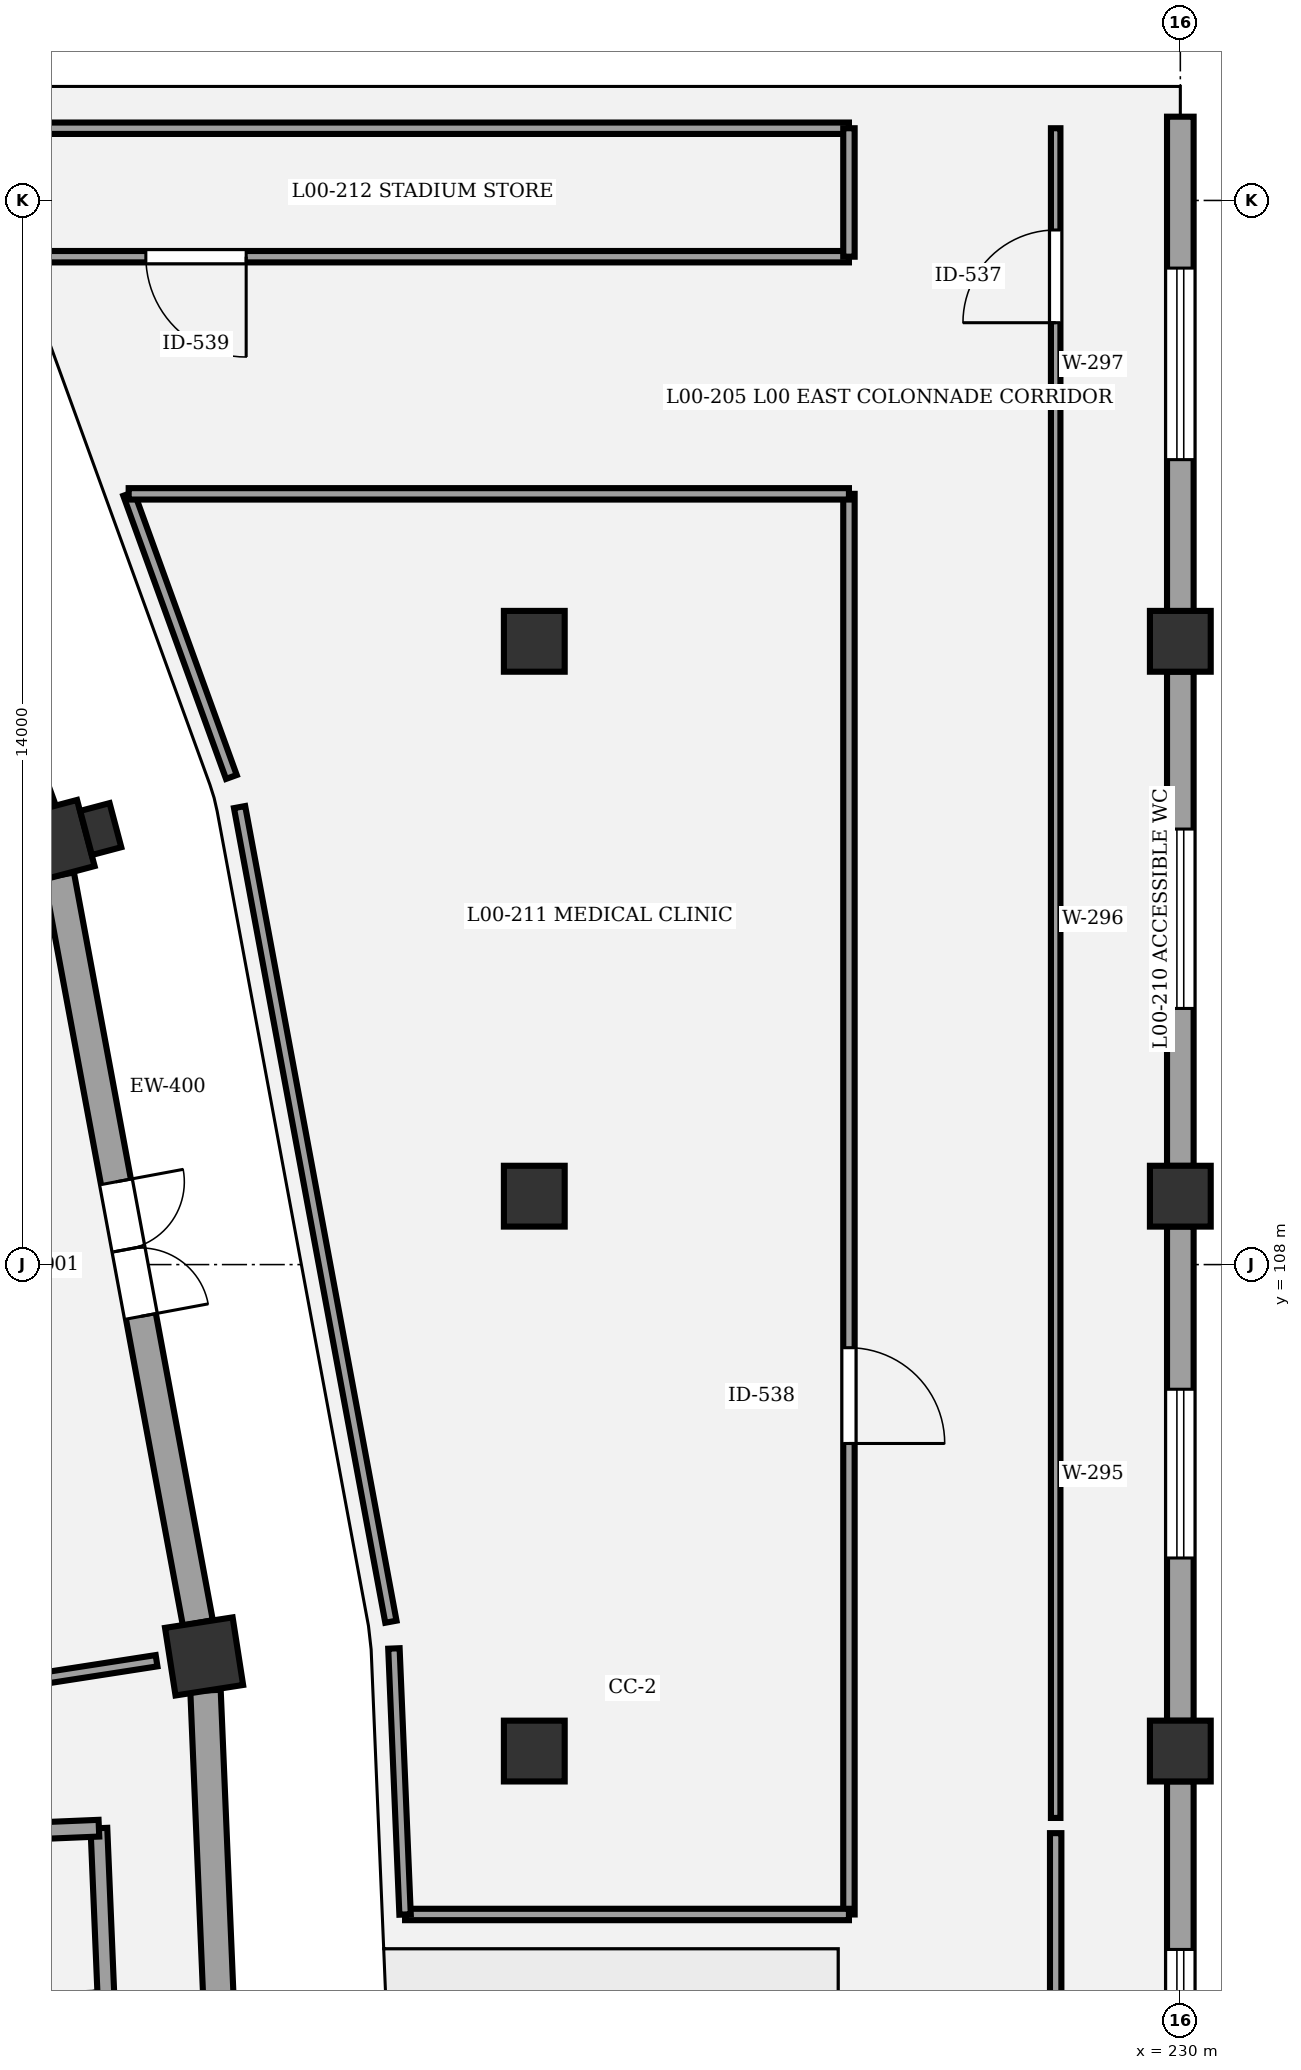
"""IFC4 building model, lengths in metres.
Left out: names, types, materials, properties, quantities, classifications, styles, units other than length and angle.
Written with IfcOpenShell. Run it as: python <this file> out.ifc"""

import sys

from ifc_helpers import new_model, si_unit, direction, frame, frame_2d, origin, origin_2d, place, context, subcontext, project, spatial, rectangle, circle, extrude, element, fill, save


model = new_model("IFC4")
c1 = context("Model", 3, precision=1e-05, world=origin(), true_north=direction((0.0, 1.0)))
c2 = subcontext(c1, "Body", "Model", "MODEL_VIEW")
j1 = project(units=[si_unit("LENGTHUNIT", "METRE"), si_unit("PLANEANGLEUNIT", "RADIAN")], contexts=[c1])
p1 = place(None, origin())
s1 = spatial("IfcSite", under=j1, at=p1, CompositionType="ELEMENT")
p2 = place(p1, origin())
s2 = spatial("IfcBuilding", under=s1, at=p2, CompositionType="ELEMENT")
p3 = place(p2, origin())
s3 = spatial("IfcBuildingStorey", under=s2, at=p3, CompositionType="ELEMENT", Elevation=0.0)
for number, where, z_axis, x_axis in (
    (1, (217.156, 102.845, 0.0), (0.0, 0.0, 1.0), (0.988, 0.153, 0.0)),
    (2, (215.165, 113.562, 0.0), (0.0, 0.0, 1.0), (0.967, 0.256, 0.0)),
):
    element("IfcColumn", number, at=place(p3, frame(where, z_axis=z_axis, x_axis=x_axis)), inside=s3, PredefinedType="COLUMN", context=c2, shape_type="SweptSolid", body=[
        extrude(rectangle(XDim=0.9, YDim=0.9, at=origin_2d()), origin(), (0.0, 0.0, 1.0), 5.4),
    ])
p4 = place(p3, frame((215.796, 113.73, 0.0), z_axis=(0.0, 0.0, 1.0), x_axis=(-0.256289373133, 0.966600102017, 0.0)))
e3 = element("IfcColumn", 3, at=p4, inside=s3, PredefinedType="PILASTER", context=c2, shape_type="SweptSolid", body=[
    extrude(rectangle(XDim=0.6, YDim=0.4, at=origin_2d()), origin(), (0.0, 0.0, 1.0), 5.4),
])
for number, where, z_axis, x_axis in (
    (4, (221.5, 101.6, 0.0), (0.0, 0.0, 1.0), (1.0, 0.0, 0.0)),
    (5, (221.5, 108.9, 0.0), (0.0, 0.0, 1.0), (1.0, 0.0, 0.0)),
    (6, (221.5, 116.2, 0.0), (0.0, 0.0, 1.0), (1.0, 0.0, 0.0)),
    (7, (230.0, 101.6, 0.0), (0.0, 0.0, 1.0), (1.0, 0.0, 0.0)),
    (8, (230.0, 108.9, 0.0), (0.0, 0.0, 1.0), (1.0, 0.0, 0.0)),
    (9, (230.0, 116.2, 0.0), (0.0, 0.0, 1.0), (1.0, 0.0, 0.0)),
):
    element("IfcColumn", number, at=place(p3, frame(where, z_axis=z_axis, x_axis=x_axis)), inside=s3, PredefinedType="COLUMN", context=c2, shape_type="SweptSolid", body=[
        extrude(circle(Radius=0.4, at=origin_2d()), origin(), (0.0, 0.0, 1.0), 5.4),
    ])
p5 = place(p3, frame((217.174, 102.397, 0.0), z_axis=(0.0, 0.0, 1.0), x_axis=(0.041899972393, -0.999121810548, 0.0)))
e10 = element("IfcWall", 10, at=p5, inside=s3, PredefinedType="STANDARD", context=c2, shape_type="SweptSolid", body=[
    extrude(rectangle(XDim=14.963, YDim=0.4, at=frame_2d((7.481, 0.0))), origin(), (0.0, 0.0, 1.0), 4.25),
])
p6 = place(p5, frame((6.931, 0.0, 1.1)))
e11 = element("IfcOpeningElement", 11, at=p6, cuts=e10, PredefinedType="OPENING", context=c2, shape_type="SweptSolid", body=[
    extrude(rectangle(XDim=1.1, YDim=1.55, at=frame_2d((0.55, 0.775))), frame((0.0, 0.21, 0.0), z_axis=(0.0, -1.0, 0.0), x_axis=(1.0, 0.0, 0.0)), (0.0, 0.0, 1.0), 0.42),
])
p7 = place(p3, frame((215.246, 113.122, 0.0), z_axis=(0.0, 0.0, 1.0), x_axis=(0.182624880635, -0.98318266511, 0.0)))
e12 = element("IfcWall", 12, at=p7, inside=s3, PredefinedType="STANDARD", context=c2, shape_type="SweptSolid", body=[
    extrude(rectangle(XDim=10.005, YDim=0.4, at=frame_2d((5.002, 0.0))), origin(), (0.0, 0.0, 1.0), 4.25),
])
p8 = place(p7, frame((4.102, 0.0, 0.0)))
e13 = element("IfcOpeningElement", 13, at=p8, cuts=e12, PredefinedType="OPENING", context=c2, shape_type="SweptSolid", body=[
    extrude(rectangle(XDim=1.8, YDim=2.4, at=frame_2d((0.9, 1.2))), frame((0.0, 0.21, 0.0), z_axis=(0.0, -1.0, 0.0), x_axis=(1.0, 0.0, 0.0)), (0.0, 0.0, 1.0), 0.42),
])
p9 = place(p3, frame((212.009, 122.261, 0.0), z_axis=(0.0, 0.0, 1.0), x_axis=(0.341030587203, -0.940052199929, 0.0)))
e14 = element("IfcWall", 14, at=p9, inside=s3, PredefinedType="STANDARD", context=c2, shape_type="SweptSolid", body=[
    extrude(rectangle(XDim=8.805, YDim=0.4, at=frame_2d((4.403, 0.0))), origin(), (0.0, 0.0, 1.0), 4.25),
])
p10 = place(p9, frame((3.453, 0.0, 0.0)))
e15 = element("IfcOpeningElement", 15, at=p10, cuts=e14, PredefinedType="OPENING", context=c2, shape_type="SweptSolid", body=[
    extrude(rectangle(XDim=1.9, YDim=2.4, at=frame_2d((0.95, 1.2))), frame((0.0, 0.21, 0.0), z_axis=(0.0, -1.0, 0.0), x_axis=(1.0, 0.0, 0.0)), (0.0, 0.0, 1.0), 0.42),
])
p11 = place(p3, frame((230.0, 101.202, 0.0), z_axis=(0.0, 0.0, 1.0), x_axis=(0.0, -1.0, 0.0)))
e16 = element("IfcWall", 16, at=p11, inside=s3, PredefinedType="STANDARD", context=c2, shape_type="SweptSolid", body=[
    extrude(rectangle(XDim=6.504, YDim=0.35, at=frame_2d((3.252, 0.0))), origin(), (0.0, 0.0, 1.0), 4.16),
])
p12 = place(p11, frame((2.212, 0.0, 0.9)))
e17 = element("IfcOpeningElement", 17, at=p12, cuts=e16, PredefinedType="OPENING", context=c2, shape_type="SweptSolid", body=[
    extrude(rectangle(XDim=2.08, YDim=1.95, at=frame_2d((1.04, 0.975))), frame((0.0, 0.185, 0.0), z_axis=(0.0, -1.0, 0.0), x_axis=(1.0, 0.0, 0.0)), (0.0, 0.0, 1.0), 0.37),
])
p13 = place(p3, frame((230.0, 108.502, 0.0), z_axis=(0.0, 0.0, 1.0), x_axis=(0.0, -1.0, 0.0)))
e18 = element("IfcWall", 18, at=p13, inside=s3, PredefinedType="STANDARD", context=c2, shape_type="SweptSolid", body=[
    extrude(rectangle(XDim=6.504, YDim=0.35, at=frame_2d((3.252, 0.0))), origin(), (0.0, 0.0, 1.0), 4.16),
])
p14 = place(p13, frame((2.142, 0.0, 0.9)))
e19 = element("IfcOpeningElement", 19, at=p14, cuts=e18, PredefinedType="OPENING", context=c2, shape_type="SweptSolid", body=[
    extrude(rectangle(XDim=2.22, YDim=1.95, at=frame_2d((1.11, 0.975))), frame((0.0, 0.185, 0.0), z_axis=(0.0, -1.0, 0.0), x_axis=(1.0, 0.0, 0.0)), (0.0, 0.0, 1.0), 0.37),
])
p15 = place(p3, frame((230.0, 115.802, 0.0), z_axis=(0.0, 0.0, 1.0), x_axis=(0.0, -1.0, 0.0)))
e20 = element("IfcWall", 20, at=p15, inside=s3, PredefinedType="STANDARD", context=c2, shape_type="SweptSolid", body=[
    extrude(rectangle(XDim=6.504, YDim=0.35, at=frame_2d((3.252, 0.0))), origin(), (0.0, 0.0, 1.0), 4.16),
])
p16 = place(p15, frame((2.072, 0.0, 0.9)))
e21 = element("IfcOpeningElement", 21, at=p16, cuts=e20, PredefinedType="OPENING", context=c2, shape_type="SweptSolid", body=[
    extrude(rectangle(XDim=2.36, YDim=1.95, at=frame_2d((1.18, 0.975))), frame((0.0, 0.185, 0.0), z_axis=(0.0, -1.0, 0.0), x_axis=(1.0, 0.0, 0.0)), (0.0, 0.0, 1.0), 0.37),
])
p17 = place(p3, frame((230.0, 123.102, 0.0), z_axis=(0.0, 0.0, 1.0), x_axis=(0.0, -1.0, 0.0)))
e22 = element("IfcWall", 22, at=p17, inside=s3, PredefinedType="STANDARD", context=c2, shape_type="SweptSolid", body=[
    extrude(rectangle(XDim=6.504, YDim=0.35, at=frame_2d((3.252, 0.0))), origin(), (0.0, 0.0, 1.0), 4.16),
])
p18 = place(p17, frame((1.992, 0.0, 0.9)))
e23 = element("IfcOpeningElement", 23, at=p18, cuts=e22, PredefinedType="OPENING", context=c2, shape_type="SweptSolid", body=[
    extrude(rectangle(XDim=2.52, YDim=1.95, at=frame_2d((1.26, 0.975))), frame((0.0, 0.185, 0.0), z_axis=(0.0, -1.0, 0.0), x_axis=(1.0, 0.0, 0.0)), (0.0, 0.0, 1.0), 0.37),
])
p19 = place(p3, frame((215.772, 100.585, 0.0), z_axis=(0.0, 0.0, 1.0), x_axis=(0.041871977473, -0.999122984173, 0.0)))
e24 = element("IfcWall", 24, at=p19, inside=s3, PredefinedType="SHEAR", context=c2, shape_type="SweptSolid", body=[
    extrude(rectangle(XDim=11.02, YDim=0.22, at=frame_2d((5.51, 0.0))), origin(), (0.0, 0.0, 1.0), 5.15),
])
p20 = place(p3, frame((211.365, 100.4, 0.0), z_axis=(0.0, 0.0, 1.0), x_axis=(0.999121521721, 0.041906859039, 0.0)))
e25 = element("IfcWall", 25, at=p20, inside=s3, PredefinedType="SHEAR", context=c2, shape_type="SweptSolid", body=[
    extrude(rectangle(XDim=4.41, YDim=0.22, at=frame_2d((2.205, 0.0))), origin(), (0.0, 0.0, 1.0), 5.15),
])
p21 = place(p3, frame((228.36, 78.29, 0.0), z_axis=(0.0, 0.0, 1.0), x_axis=(0.0, 1.0, 0.0)))
e26 = element("IfcWall", 26, at=p21, inside=s3, PredefinedType="PARTITIONING", context=c2, shape_type="SweptSolid", body=[
    extrude(rectangle(XDim=22.23, YDim=0.15, at=frame_2d((11.115, 0.0))), origin(), (0.0, 0.0, 1.0), 4.15),
])
p22 = place(p21, frame((4.402, 0.0, 0.0)))
e27 = element("IfcOpeningElement", 27, at=p22, cuts=e26, PredefinedType="OPENING", context=c2, shape_type="SweptSolid", body=[
    extrude(rectangle(XDim=1.18, YDim=2.3, at=frame_2d((0.59, 1.15))), frame((0.0, 0.085, 0.0), z_axis=(0.0, -1.0, 0.0), x_axis=(1.0, 0.0, 0.0)), (0.0, 0.0, 1.0), 0.17),
])
p23 = place(p3, frame((228.36, 100.72, 0.0), z_axis=(0.0, 0.0, 1.0), x_axis=(0.0, 1.0, 0.0)))
e28 = element("IfcWall", 28, at=p23, inside=s3, PredefinedType="PARTITIONING", context=c2, shape_type="SweptSolid", body=[
    extrude(rectangle(XDim=22.23, YDim=0.125, at=frame_2d((11.115, 0.0))), origin(), (0.0, 0.0, 1.0), 4.15),
])
p24 = place(p23, frame((19.671, 0.0, 0.0)))
e29 = element("IfcOpeningElement", 29, at=p24, cuts=e28, PredefinedType="OPENING", context=c2, shape_type="SweptSolid", body=[
    extrude(rectangle(XDim=1.22, YDim=2.3, at=frame_2d((0.61, 1.15))), frame((0.0, 0.073, 0.0), z_axis=(0.0, -1.0, 0.0), x_axis=(1.0, 0.0, 0.0)), (0.0, 0.0, 1.0), 0.145),
])
p25 = place(p3, frame((225.64, 118.14, 0.0), z_axis=(0.0, 0.0, 1.0), x_axis=(0.0, -1.0, 0.0)))
e30 = element("IfcWall", 30, at=p25, inside=s3, PredefinedType="PARTITIONING", context=c2, shape_type="SweptSolid", body=[
    extrude(rectangle(XDim=18.69, YDim=0.15, at=frame_2d((9.345, 0.0))), origin(), (0.0, 0.0, 1.0), 4.15),
])
p26 = place(p25, frame((11.233, 0.0, 0.0)))
e31 = element("IfcOpeningElement", 31, at=p26, cuts=e30, PredefinedType="OPENING", context=c2, shape_type="SweptSolid", body=[
    extrude(rectangle(XDim=1.26, YDim=2.3, at=frame_2d((0.63, 1.15))), frame((0.0, 0.085, 0.0), z_axis=(0.0, -1.0, 0.0), x_axis=(1.0, 0.0, 0.0)), (0.0, 0.0, 1.0), 0.17),
])
p27 = place(p3, frame((225.64, 121.26, 0.0), z_axis=(0.0, 0.0, 1.0), x_axis=(-1.0, 0.0, 0.0)))
e32 = element("IfcWall", 32, at=p27, inside=s3, PredefinedType="PARTITIONING", context=c2, shape_type="SweptSolid", body=[
    extrude(rectangle(XDim=10.608, YDim=0.15, at=frame_2d((5.304, 0.0))), origin(), (0.0, 0.0, 1.0), 4.15),
])
p28 = place(p27, frame((7.931, 0.0, 0.0)))
e33 = element("IfcOpeningElement", 33, at=p28, cuts=e32, PredefinedType="OPENING", context=c2, shape_type="SweptSolid", body=[
    extrude(rectangle(XDim=1.32, YDim=2.3, at=frame_2d((0.66, 1.15))), frame((0.0, 0.085, 0.0), z_axis=(0.0, -1.0, 0.0), x_axis=(1.0, 0.0, 0.0)), (0.0, 0.0, 1.0), 0.17),
])
p29 = place(p3, frame((216.53, 102.789, 0.0), z_axis=(0.0, 0.0, 1.0), x_axis=(-0.988185582016, -0.153262048451, 0.0)))
e34 = element("IfcWall", 34, at=p29, inside=s3, PredefinedType="PARTITIONING", context=c2, shape_type="SweptSolid", body=[
    extrude(rectangle(XDim=7.917, YDim=0.15, at=frame_2d((3.958, 0.0))), origin(), (0.0, 0.0, 1.0), 4.15),
])
p30 = place(p3, frame((219.613, 103.302, 0.0), z_axis=(0.0, 0.0, 1.0), x_axis=(-0.182620957058, 0.983183393901, 0.0)))
e35 = element("IfcWall", 35, at=p30, inside=s3, PredefinedType="PARTITIONING", context=c2, shape_type="SweptSolid", body=[
    extrude(rectangle(XDim=10.901, YDim=0.15, at=frame_2d((5.45, 0.0))), origin(), (0.0, 0.0, 1.0), 4.15),
])
p31 = place(p3, frame((217.515, 114.415, 0.0), z_axis=(0.0, 0.0, 1.0), x_axis=(-0.341035525383, 0.94005040845, 0.0)))
e36 = element("IfcWall", 36, at=p31, inside=s3, PredefinedType="PARTITIONING", context=c2, shape_type="SweptSolid", body=[
    extrude(rectangle(XDim=3.962, YDim=0.15, at=frame_2d((1.981, 0.0))), origin(), (0.0, 0.0, 1.0), 4.15),
])
p32 = place(p3, frame((216.163, 118.14, 0.0), z_axis=(0.0, 0.0, 1.0), x_axis=(1.0, 0.0, 0.0)))
e37 = element("IfcWall", 37, at=p32, inside=s3, PredefinedType="PARTITIONING", context=c2, shape_type="SweptSolid", body=[
    extrude(rectangle(XDim=9.477, YDim=0.15, at=frame_2d((4.738, 0.0))), origin(), (0.0, 0.0, 1.0), 4.15),
])
p33 = place(p3, frame((225.64, 99.45, 0.0), z_axis=(0.0, 0.0, 1.0), x_axis=(-1.0, 0.0, 0.0)))
e38 = element("IfcWall", 38, at=p33, inside=s3, PredefinedType="PARTITIONING", context=c2, shape_type="SweptSolid", body=[
    extrude(rectangle(XDim=5.84, YDim=0.15, at=frame_2d((2.92, 0.0))), origin(), (0.0, 0.0, 1.0), 4.15),
])
p34 = place(p3, frame((219.8, 99.45, 0.0), z_axis=(0.0, 0.0, 1.0), x_axis=(-0.041888559174, 0.999122289117, 0.0)))
e39 = element("IfcWall", 39, at=p34, inside=s3, PredefinedType="PARTITIONING", context=c2, shape_type="SweptSolid", body=[
    extrude(rectangle(XDim=3.503, YDim=0.15, at=frame_2d((1.751, 0.0))), origin(), (0.0, 0.0, 1.0), 4.15),
])
p35 = place(p3, frame((214.418, 122.95, 0.0), z_axis=(0.0, 0.0, 1.0), x_axis=(1.0, 0.0, 0.0)))
e40 = element("IfcWall", 40, at=p35, inside=s3, PredefinedType="PARTITIONING", context=c2, shape_type="SweptSolid", body=[
    extrude(rectangle(XDim=11.221, YDim=0.15, at=frame_2d((5.611, 0.0))), origin(), (0.0, 0.0, 1.0), 4.15),
])
p36 = place(p3, frame((225.64, 122.95, 0.0), z_axis=(0.0, 0.0, 1.0), x_axis=(0.0, -1.0, 0.0)))
e41 = element("IfcWall", 41, at=p36, inside=s3, PredefinedType="PARTITIONING", context=c2, shape_type="SweptSolid", body=[
    extrude(rectangle(XDim=1.69, YDim=0.15, at=frame_2d((0.845, 0.0))), origin(), (0.0, 0.0, 1.0), 4.15),
])
p37 = place(p8, origin())
e42 = element("IfcDoor", 42, at=p37, inside=s3, OperationType="DOUBLE_DOOR_SINGLE_SWING", PredefinedType="DOOR", context=c2, shape_type="SweptSolid", body=[
    extrude(rectangle(XDim=1.8, YDim=2.4, at=frame_2d((0.9, 1.2))), frame((0.0, 0.025, 0.0), z_axis=(0.0, -1.0, 0.0), x_axis=(1.0, 0.0, 0.0)), (0.0, 0.0, 1.0), 0.05),
])
fill(e13, e42)
p38 = place(p12, origin())
e43 = element("IfcWindow", 43, at=p38, inside=s3, PartitioningType="SINGLE_PANEL", PredefinedType="WINDOW", context=c2, shape_type="SweptSolid", body=[
    extrude(rectangle(XDim=2.08, YDim=1.95, at=frame_2d((1.04, 0.975))), frame((0.0, 0.03, 0.0), z_axis=(0.0, -1.0, 0.0), x_axis=(1.0, 0.0, 0.0)), (0.0, 0.0, 1.0), 0.06),
])
fill(e17, e43)
p39 = place(p14, origin())
e44 = element("IfcWindow", 44, at=p39, inside=s3, PartitioningType="SINGLE_PANEL", PredefinedType="WINDOW", context=c2, shape_type="SweptSolid", body=[
    extrude(rectangle(XDim=2.22, YDim=1.95, at=frame_2d((1.11, 0.975))), frame((0.0, 0.03, 0.0), z_axis=(0.0, -1.0, 0.0), x_axis=(1.0, 0.0, 0.0)), (0.0, 0.0, 1.0), 0.06),
])
fill(e19, e44)
p40 = place(p16, origin())
e45 = element("IfcWindow", 45, at=p40, inside=s3, PartitioningType="SINGLE_PANEL", PredefinedType="WINDOW", context=c2, shape_type="SweptSolid", body=[
    extrude(rectangle(XDim=2.36, YDim=1.95, at=frame_2d((1.18, 0.975))), frame((0.0, 0.03, 0.0), z_axis=(0.0, -1.0, 0.0), x_axis=(1.0, 0.0, 0.0)), (0.0, 0.0, 1.0), 0.06),
])
fill(e21, e45)
p41 = place(p18, origin())
e46 = element("IfcWindow", 46, at=p41, inside=s3, PartitioningType="SINGLE_PANEL", PredefinedType="WINDOW", context=c2, shape_type="SweptSolid", body=[
    extrude(rectangle(XDim=2.52, YDim=1.95, at=frame_2d((1.26, 0.975))), frame((0.0, 0.03, 0.0), z_axis=(0.0, -1.0, 0.0), x_axis=(1.0, 0.0, 0.0)), (0.0, 0.0, 1.0), 0.06),
])
fill(e23, e46)
p42 = place(p24, origin())
e47 = element("IfcDoor", 47, at=p42, inside=s3, OperationType="SINGLE_SWING_LEFT", PredefinedType="DOOR", context=c2, shape_type="SweptSolid", body=[
    extrude(rectangle(XDim=1.22, YDim=2.3, at=frame_2d((0.61, 1.15))), frame((0.0, 0.025, 0.0), z_axis=(0.0, -1.0, 0.0), x_axis=(1.0, 0.0, 0.0)), (0.0, 0.0, 1.0), 0.05),
])
fill(e29, e47)
p43 = place(p26, origin())
e48 = element("IfcDoor", 48, at=p43, inside=s3, OperationType="SINGLE_SWING_RIGHT", PredefinedType="DOOR", context=c2, shape_type="SweptSolid", body=[
    extrude(rectangle(XDim=1.26, YDim=2.3, at=frame_2d((0.63, 1.15))), frame((0.0, 0.025, 0.0), z_axis=(0.0, -1.0, 0.0), x_axis=(1.0, 0.0, 0.0)), (0.0, 0.0, 1.0), 0.05),
])
fill(e31, e48)
p44 = place(p28, origin())
e49 = element("IfcDoor", 49, at=p44, inside=s3, OperationType="SINGLE_SWING_LEFT", PredefinedType="DOOR", context=c2, shape_type="SweptSolid", body=[
    extrude(rectangle(XDim=1.32, YDim=2.3, at=frame_2d((0.66, 1.15))), frame((0.0, 0.025, 0.0), z_axis=(0.0, -1.0, 0.0), x_axis=(1.0, 0.0, 0.0)), (0.0, 0.0, 1.0), 0.05),
])
fill(e33, e49)
save(model, sys.argv[1])
